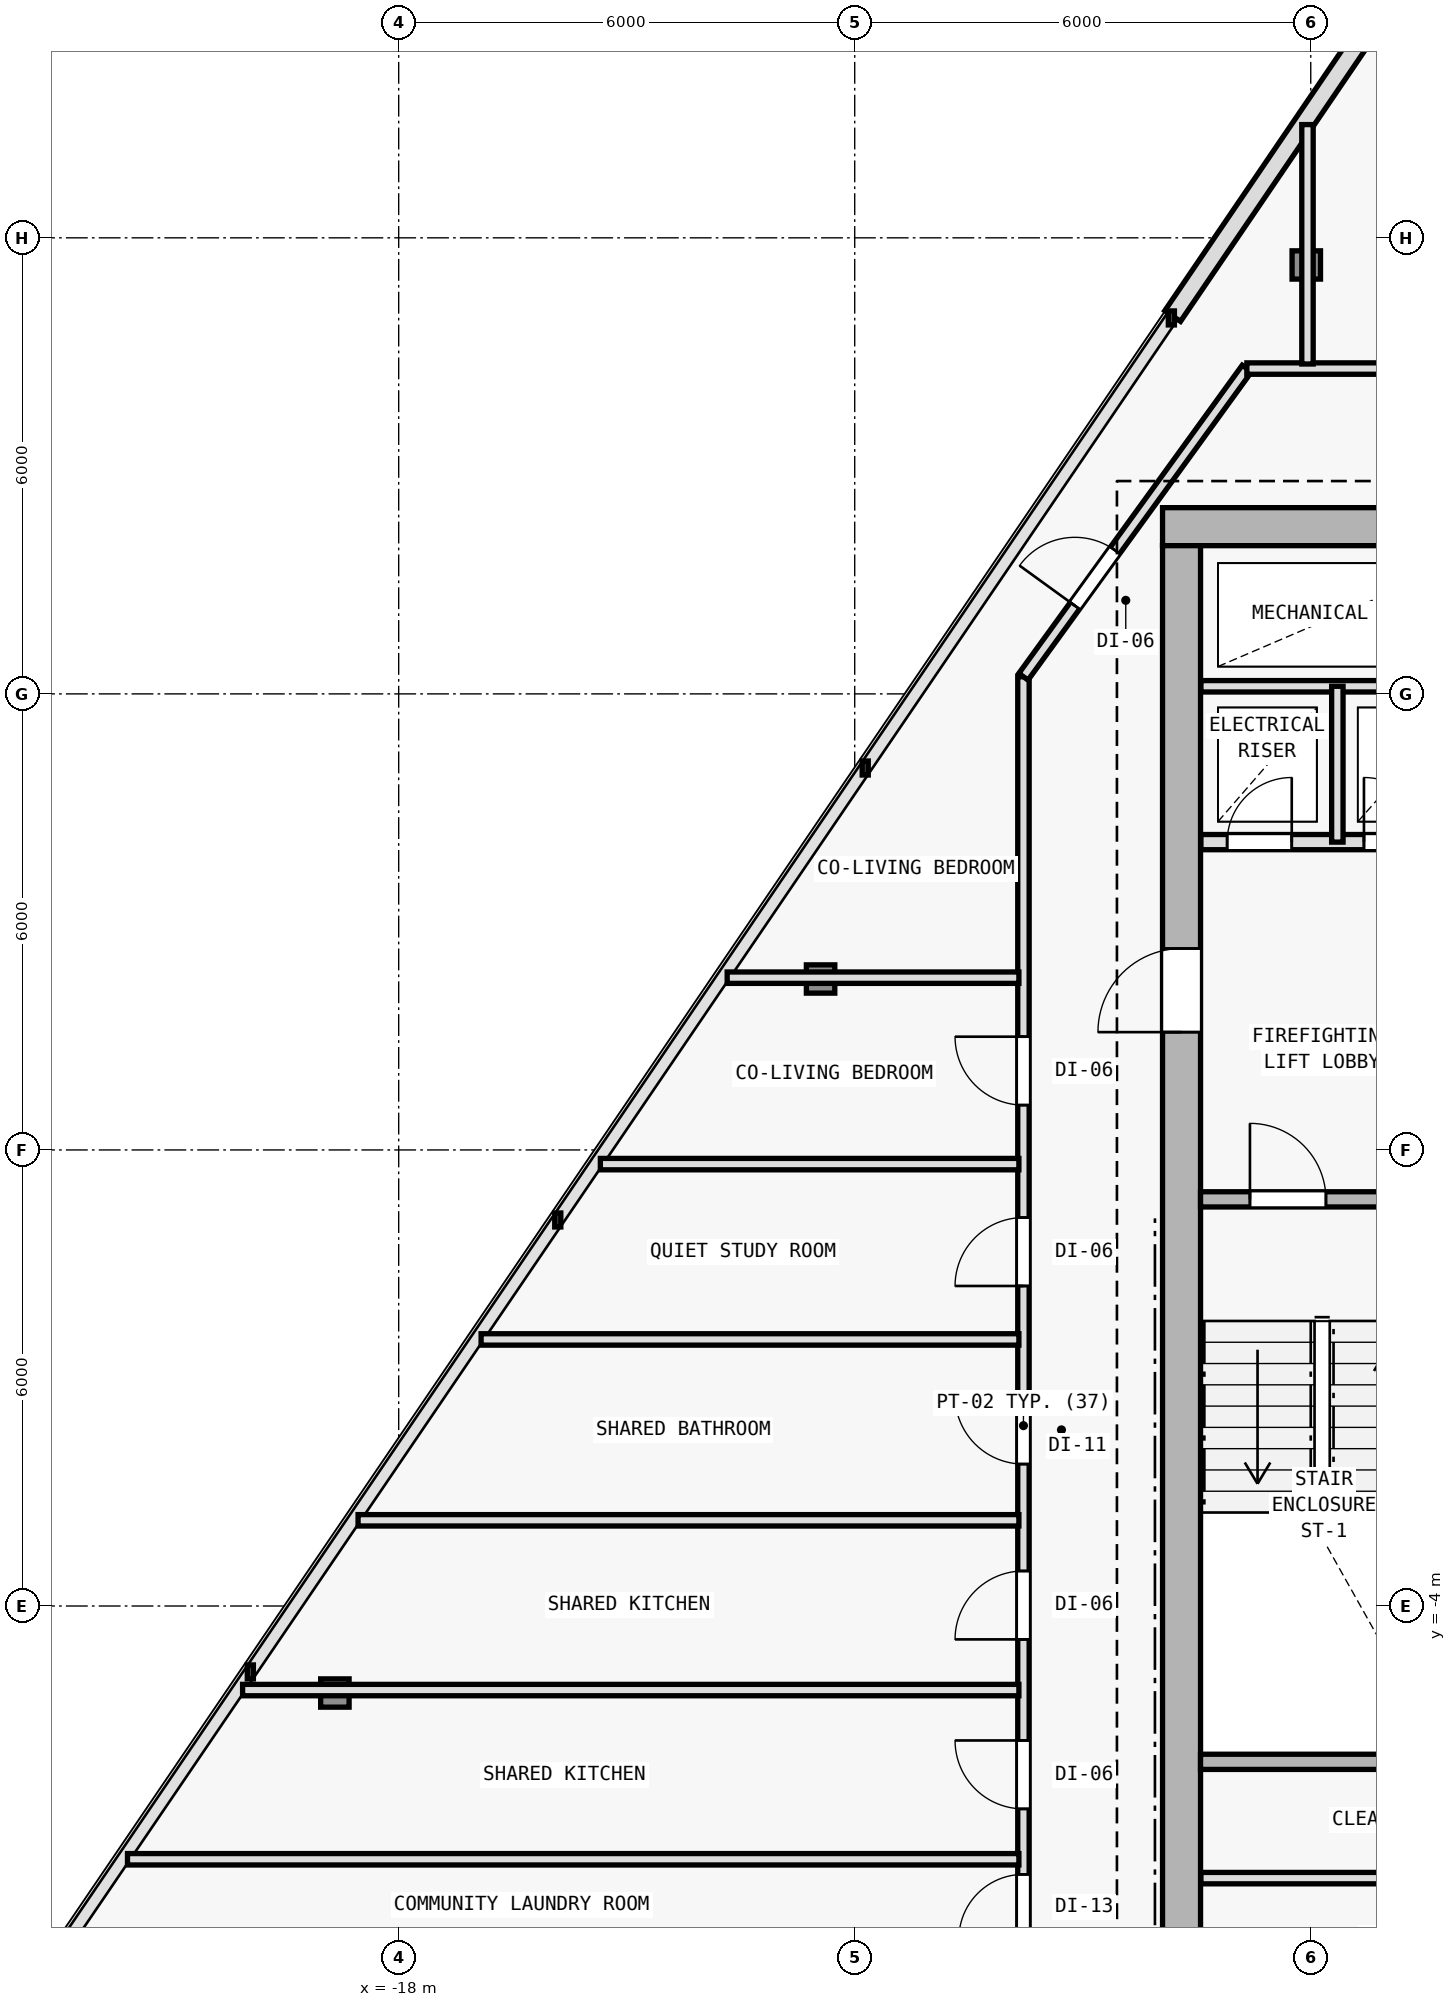
"""IFC4 building model, lengths in metres.
Left out: names, types, materials, properties, quantities, classifications, styles, units other than length and angle.
Written with IfcOpenShell. Run it as: python <this file> out.ifc"""

import sys

from ifc_helpers import new_model, si_unit, direction, frame, frame_2d, origin, origin_2d, place, context, subcontext, project, spatial, rectangle, i_section, extrude, element, fill, save


model = new_model("IFC4")
c1 = context("Model", 3, precision=1e-05, world=origin(), true_north=direction((0.0, 1.0)))
c2 = subcontext(c1, "Body", "Model", "MODEL_VIEW")
j1 = project(units=[si_unit("LENGTHUNIT", "METRE"), si_unit("PLANEANGLEUNIT", "RADIAN")], contexts=[c1])
p1 = place(None, origin())
s1 = spatial("IfcSite", under=j1, at=p1, CompositionType="ELEMENT")
p2 = place(p1, origin())
s2 = spatial("IfcBuilding", under=s1, at=p2, CompositionType="ELEMENT")
p3 = place(p2, frame((0.0, 0.0, 254.4)))
s3 = spatial("IfcBuildingStorey", under=s2, at=p3, CompositionType="ELEMENT", Elevation=254.4)
for number, where, z_axis, x_axis in (
    (1, (-7.7, 10.2, 0.0), (0.0, 0.0, 1.0), (1.0, 0.0, 0.0)),
    (2, (-7.7, 2.0, 0.0), (0.0, 0.0, 1.0), (1.0, 0.0, 0.0)),
):
    element("IfcColumn", number, at=place(p3, frame(where, z_axis=z_axis, x_axis=x_axis)), inside=s3, PredefinedType="COLUMN", context=c2, shape_type="SweptSolid", body=[
        extrude(i_section(OverallWidth=0.374, OverallDepth=0.372, WebThickness=0.012, FlangeThickness=0.02, FilletRadius=0.015, at=origin_2d()), origin(), (0.0, 0.0, 1.0), 3.6),
    ])
p4 = place(p3, frame((-6.059, 13.643, 0.006), z_axis=(0.008775143007, -0.002584925847, 0.999958156636), x_axis=(0.282568886397, 0.959247009086, 0.0)))
e3 = element("IfcColumn", 3, at=p4, inside=s3, PredefinedType="COLUMN", context=c2, shape_type="SweptSolid", body=[
    extrude(i_section(OverallWidth=0.374, OverallDepth=0.372, WebThickness=0.012, FlangeThickness=0.02, FilletRadius=0.015, at=origin_2d()), origin(), (0.0, 0.0, 1.0), 3.589),
])
p5 = place(p3, frame((-12.449, 4.249, 0.006), z_axis=(0.017071556321, 0.009589997774, 0.999808278575), x_axis=(-0.489766415861, 0.871853690647, 0.0)))
e4 = element("IfcColumn", 4, at=p5, inside=s3, PredefinedType="COLUMN", context=c2, shape_type="SweptSolid", body=[
    extrude(i_section(OverallWidth=0.374, OverallDepth=0.372, WebThickness=0.012, FlangeThickness=0.02, FilletRadius=0.015, at=origin_2d()), origin(), (0.0, 0.0, 1.0), 3.59),
])
p6 = place(p3, frame((-18.84, -5.145, 0.006), z_axis=(0.025224163578, 0.021620711639, 0.999447990843), x_axis=(-0.650791373456, 0.759256602365, 0.0)))
e5 = element("IfcColumn", 5, at=p6, inside=s3, PredefinedType="COLUMN", context=c2, shape_type="SweptSolid", body=[
    extrude(i_section(OverallWidth=0.374, OverallDepth=0.372, WebThickness=0.012, FlangeThickness=0.02, FilletRadius=0.015, at=origin_2d()), origin(), (0.0, 0.0, 1.0), 3.591),
])
p7 = place(p3, frame((-7.817, 12.971, 0.0), z_axis=(0.0, 0.0, 1.0), x_axis=(0.562474530687, 0.826814611826, 0.0)))
e6 = element("IfcWall", 6, at=p7, inside=s3, PredefinedType="SOLIDWALL", context=c2, shape_type="SweptSolid", body=[
    extrude(rectangle(XDim=10.107, YDim=0.25, at=frame_2d((5.053, 0.0))), origin(), (0.0, 0.0, 1.0), 3.35),
])
p8 = place(p7, frame((4.604, 0.0, 0.62)))
e7 = element("IfcOpeningElement", 7, at=p8, cuts=e6, PredefinedType="OPENING", context=c2, shape_type="SweptSolid", body=[
    extrude(rectangle(XDim=0.9, YDim=1.6, at=frame_2d((0.45, 0.8))), frame((0.0, 0.135, 0.0), z_axis=(0.0, -1.0, 0.0), x_axis=(1.0, 0.0, 0.0)), (0.0, 0.0, 1.0), 0.27),
])
p9 = place(p3, frame((7.95, 10.2, 0.0), z_axis=(0.0, 0.0, 1.0), x_axis=(-1.0, 0.0, 0.0)))
e8 = element("IfcWall", 8, at=p9, inside=s3, PredefinedType="SHEAR", context=c2, shape_type="SweptSolid", body=[
    extrude(rectangle(XDim=15.9, YDim=0.5, at=frame_2d((7.95, 0.0))), origin(), (0.0, 0.0, 1.0), 3.35),
])
p10 = place(p9, frame((4.4, 0.0, 0.0)))
e9 = element("IfcOpeningElement", 9, at=p10, cuts=e8, PredefinedType="OPENING", context=c2, shape_type="SweptSolid", body=[
    extrude(rectangle(XDim=1.1, YDim=2.15, at=frame_2d((0.55, 1.075))), frame((0.0, 0.26, 0.0), z_axis=(0.0, -1.0, 0.0), x_axis=(1.0, 0.0, 0.0)), (0.0, 0.0, 1.0), 0.52),
])
p11 = place(p3, frame((-7.7, -9.15, 0.0), z_axis=(0.0, 0.0, 1.0), x_axis=(0.0, 1.0, 0.0)))
e10 = element("IfcWall", 10, at=p11, inside=s3, PredefinedType="SHEAR", context=c2, shape_type="SweptSolid", body=[
    extrude(rectangle(XDim=19.1, YDim=0.5, at=frame_2d((9.55, 0.0))), origin(), (0.0, 0.0, 1.0), 3.35),
])
p12 = place(p11, frame((12.7, 0.0, 0.0)))
e11 = element("IfcOpeningElement", 11, at=p12, cuts=e10, PredefinedType="OPENING", context=c2, shape_type="SweptSolid", body=[
    extrude(rectangle(XDim=1.1, YDim=2.15, at=frame_2d((0.55, 1.075))), frame((0.0, 0.26, 0.0), z_axis=(0.0, -1.0, 0.0), x_axis=(1.0, 0.0, 0.0)), (0.0, 0.0, 1.0), 0.52),
])
p13 = place(p3, frame((-7.45, 1.35, 0.0), z_axis=(0.0, 0.0, 1.0), x_axis=(1.0, 0.0, 0.0)))
e12 = element("IfcWall", 12, at=p13, inside=s3, PredefinedType="SOLIDWALL", context=c2, shape_type="SweptSolid", body=[
    extrude(rectangle(XDim=3.4, YDim=0.2, at=frame_2d((1.7, 0.0))), origin(), (0.0, 0.0, 1.0), 3.35),
])
p14 = place(p13, frame((0.65, 0.0, 0.0)))
e13 = element("IfcOpeningElement", 13, at=p14, cuts=e12, PredefinedType="OPENING", context=c2, shape_type="SweptSolid", body=[
    extrude(rectangle(XDim=1.0, YDim=2.15, at=frame_2d((0.5, 1.075))), frame((0.0, 0.11, 0.0), z_axis=(0.0, -1.0, 0.0), x_axis=(1.0, 0.0, 0.0)), (0.0, 0.0, 1.0), 0.22),
])
p15 = place(p3, frame((-7.445, 6.05, 0.0), z_axis=(0.0, 0.0, 1.0), x_axis=(1.0, 0.0, 0.0)))
e14 = element("IfcWall", 14, at=p15, inside=s3, PredefinedType="SOLIDWALL", context=c2, shape_type="SweptSolid", body=[
    extrude(rectangle(XDim=3.595, YDim=0.2, at=frame_2d((1.797, 0.0))), origin(), (0.0, 0.0, 1.0), 3.35),
])
p16 = place(p15, frame((0.345, 0.0, 0.0)))
e15 = element("IfcOpeningElement", 15, at=p16, cuts=e14, PredefinedType="OPENING", context=c2, shape_type="SweptSolid", body=[
    extrude(rectangle(XDim=0.85, YDim=2.1, at=frame_2d((0.425, 1.05))), frame((0.0, 0.11, 0.0), z_axis=(0.0, -1.0, 0.0), x_axis=(1.0, 0.0, 0.0)), (0.0, 0.0, 1.0), 0.22),
])
p17 = place(p15, frame((2.145, 0.0, 0.0)))
e16 = element("IfcOpeningElement", 16, at=p17, cuts=e14, PredefinedType="OPENING", context=c2, shape_type="SweptSolid", body=[
    extrude(rectangle(XDim=0.85, YDim=2.1, at=frame_2d((0.425, 1.05))), frame((0.0, 0.11, 0.0), z_axis=(0.0, -1.0, 0.0), x_axis=(1.0, 0.0, 0.0)), (0.0, 0.0, 1.0), 0.22),
])
p18 = place(p3, frame((-7.445, 8.1, 0.0), z_axis=(0.0, 0.0, 1.0), x_axis=(1.0, 0.0, 0.0)))
e17 = element("IfcWall", 17, at=p18, inside=s3, PredefinedType="PARTITIONING", context=c2, shape_type="SweptSolid", body=[
    extrude(rectangle(XDim=3.595, YDim=0.15, at=frame_2d((1.797, 0.0))), origin(), (0.0, 0.0, 1.0), 3.35),
])
p19 = place(p3, frame((-5.65, 6.05, 0.0), z_axis=(0.0, 0.0, 1.0), x_axis=(0.0, 1.0, 0.0)))
e18 = element("IfcWall", 18, at=p19, inside=s3, PredefinedType="PARTITIONING", context=c2, shape_type="SweptSolid", body=[
    extrude(rectangle(XDim=2.05, YDim=0.15, at=frame_2d((1.025, 0.0))), origin(), (0.0, 0.0, 1.0), 3.35),
])
p20 = place(p3, frame((-7.45, -6.05, 0.0), z_axis=(0.0, 0.0, 1.0), x_axis=(1.0, 0.0, 0.0)))
e19 = element("IfcWall", 19, at=p20, inside=s3, PredefinedType="SOLIDWALL", context=c2, shape_type="SweptSolid", body=[
    extrude(rectangle(XDim=3.4, YDim=0.2, at=frame_2d((1.7, 0.0))), origin(), (0.0, 0.0, 1.0), 3.35),
])
p21 = place(p3, frame((-7.445, -7.58, 0.0), z_axis=(0.0, 0.0, 1.0), x_axis=(1.0, 0.0, 0.0)))
e20 = element("IfcWall", 20, at=p21, inside=s3, PredefinedType="PARTITIONING", context=c2, shape_type="SweptSolid", body=[
    extrude(rectangle(XDim=6.195, YDim=0.15, at=frame_2d((3.098, 0.0))), origin(), (0.0, 0.0, 1.0), 3.35),
])
p22 = place(p3, frame((-9.78, -11.48, 0.0), z_axis=(0.0, 0.0, 1.0), x_axis=(0.0, 1.0, 0.0)))
e21 = element("IfcWall", 21, at=p22, inside=s3, PredefinedType="PARTITIONING", context=c2, shape_type="SweptSolid", body=[
    extrude(rectangle(XDim=19.706, YDim=0.15, at=frame_2d((9.853, 0.0))), origin(), (0.0, 0.0, 1.0), 2.875),
])
p23 = place(p22, frame((9.347, 0.0, 0.0)))
e22 = element("IfcOpeningElement", 22, at=p23, cuts=e21, PredefinedType="OPENING", context=c2, shape_type="SweptSolid", body=[
    extrude(rectangle(XDim=0.9, YDim=2.1, at=frame_2d((0.45, 1.05))), frame((0.0, 0.085, 0.0), z_axis=(0.0, -1.0, 0.0), x_axis=(1.0, 0.0, 0.0)), (0.0, 0.0, 1.0), 0.17),
])
p24 = place(p22, frame((7.041, 0.0, 0.0)))
e23 = element("IfcOpeningElement", 23, at=p24, cuts=e21, PredefinedType="OPENING", context=c2, shape_type="SweptSolid", body=[
    extrude(rectangle(XDim=0.9, YDim=2.1, at=frame_2d((0.45, 1.05))), frame((0.0, 0.085, 0.0), z_axis=(0.0, -1.0, 0.0), x_axis=(1.0, 0.0, 0.0)), (0.0, 0.0, 1.0), 0.17),
])
p25 = place(p22, frame((4.811, 0.0, 0.0)))
e24 = element("IfcOpeningElement", 24, at=p25, cuts=e21, PredefinedType="OPENING", context=c2, shape_type="SweptSolid", body=[
    extrude(rectangle(XDim=0.9, YDim=2.1, at=frame_2d((0.45, 1.05))), frame((0.0, 0.085, 0.0), z_axis=(0.0, -1.0, 0.0), x_axis=(1.0, 0.0, 0.0)), (0.0, 0.0, 1.0), 0.17),
])
p26 = place(p22, frame((3.099, 0.0, 0.0)))
e25 = element("IfcOpeningElement", 25, at=p26, cuts=e21, PredefinedType="OPENING", context=c2, shape_type="SweptSolid", body=[
    extrude(rectangle(XDim=0.85, YDim=2.1, at=frame_2d((0.425, 1.05))), frame((0.0, 0.085, 0.0), z_axis=(0.0, -1.0, 0.0), x_axis=(1.0, 0.0, 0.0)), (0.0, 0.0, 1.0), 0.17),
])
p27 = place(p22, frame((1.114, 0.0, 0.0)))
e26 = element("IfcOpeningElement", 26, at=p27, cuts=e21, PredefinedType="OPENING", context=c2, shape_type="SweptSolid", body=[
    extrude(rectangle(XDim=0.9, YDim=2.1, at=frame_2d((0.45, 1.05))), frame((0.0, 0.085, 0.0), z_axis=(0.0, -1.0, 0.0), x_axis=(1.0, 0.0, 0.0)), (0.0, 0.0, 1.0), 0.17),
])
p28 = place(p22, frame((14.07, 0.0, 0.0)))
e27 = element("IfcOpeningElement", 27, at=p28, cuts=e21, PredefinedType="OPENING", context=c2, shape_type="SweptSolid", body=[
    extrude(rectangle(XDim=0.9, YDim=2.1, at=frame_2d((0.45, 1.05))), frame((0.0, 0.085, 0.0), z_axis=(0.0, -1.0, 0.0), x_axis=(1.0, 0.0, 0.0)), (0.0, 0.0, 1.0), 0.17),
])
p29 = place(p22, frame((11.69, 0.0, 0.0)))
e28 = element("IfcOpeningElement", 28, at=p29, cuts=e21, PredefinedType="OPENING", context=c2, shape_type="SweptSolid", body=[
    extrude(rectangle(XDim=0.9, YDim=2.1, at=frame_2d((0.45, 1.05))), frame((0.0, 0.085, 0.0), z_axis=(0.0, -1.0, 0.0), x_axis=(1.0, 0.0, 0.0)), (0.0, 0.0, 1.0), 0.17),
])
p30 = place(p3, frame((-9.78, 8.226, 0.0), z_axis=(0.0, 0.0, 1.0), x_axis=(0.586956386413, 0.809618552436, 0.0)))
e29 = element("IfcWall", 29, at=p30, inside=s3, PredefinedType="PARTITIONING", context=c2, shape_type="SweptSolid", body=[
    extrude(rectangle(XDim=5.008, YDim=0.15, at=frame_2d((2.504, 0.0))), origin(), (0.0, 0.0, 1.0), 2.925),
])
p31 = place(p30, frame((1.154, 0.0, 0.0)))
e30 = element("IfcOpeningElement", 30, at=p31, cuts=e29, PredefinedType="OPENING", context=c2, shape_type="SweptSolid", body=[
    extrude(rectangle(XDim=0.9, YDim=2.1, at=frame_2d((0.45, 1.05))), frame((0.0, 0.085, 0.0), z_axis=(0.0, -1.0, 0.0), x_axis=(1.0, 0.0, 0.0)), (0.0, 0.0, 1.0), 0.17),
])
p32 = place(p3, frame((-6.841, 12.28, 0.0), z_axis=(0.0, 0.0, 1.0), x_axis=(1.0, 0.0, 0.0)))
e31 = element("IfcWall", 31, at=p32, inside=s3, PredefinedType="PARTITIONING", context=c2, shape_type="SweptSolid", body=[
    extrude(rectangle(XDim=13.682, YDim=0.15, at=frame_2d((6.841, 0.0))), origin(), (0.0, 0.0, 1.0), 3.015),
])
p33 = place(p32, frame((4.825, 0.0, 0.0)))
e32 = element("IfcOpeningElement", 32, at=p33, cuts=e31, PredefinedType="OPENING", context=c2, shape_type="SweptSolid", body=[
    extrude(rectangle(XDim=0.9, YDim=2.1, at=frame_2d((0.45, 1.05))), frame((0.0, 0.085, 0.0), z_axis=(0.0, -1.0, 0.0), x_axis=(1.0, 0.0, 0.0)), (0.0, 0.0, 1.0), 0.17),
])
p34 = place(p3, frame((-6.043, 12.34, 0.0), z_axis=(0.0, 0.0, 1.0), x_axis=(0.0, 1.0, 0.0)))
e33 = element("IfcWall", 33, at=p34, inside=s3, PredefinedType="PARTITIONING", context=c2, shape_type="SweptSolid", body=[
    extrude(rectangle(XDim=3.15, YDim=0.15, at=frame_2d((1.575, 0.0))), origin(), (0.0, 0.0, 1.0), 3.015),
])
p35 = place(p3, frame((-9.84, 4.266, 0.0), z_axis=(0.0, 0.0, 1.0), x_axis=(-1.0, 0.0, 0.0)))
e34 = element("IfcWall", 34, at=p35, inside=s3, PredefinedType="PARTITIONING", context=c2, shape_type="SweptSolid", body=[
    extrude(rectangle(XDim=3.838, YDim=0.15, at=frame_2d((1.919, 0.0))), origin(), (0.0, 0.0, 1.0), 2.925),
])
p36 = place(p3, frame((-9.84, -5.106, 0.0), z_axis=(0.0, 0.0, 1.0), x_axis=(-1.0, 0.0, 0.0)))
e35 = element("IfcWall", 35, at=p36, inside=s3, PredefinedType="PARTITIONING", context=c2, shape_type="SweptSolid", body=[
    extrude(rectangle(XDim=10.214, YDim=0.15, at=frame_2d((5.107, 0.0))), origin(), (0.0, 0.0, 1.0), 2.875),
])
p37 = place(p3, frame((-9.84, -0.493, 0.0), z_axis=(0.0, 0.0, 1.0), x_axis=(-1.0, 0.0, 0.0)))
e36 = element("IfcWall", 36, at=p37, inside=s3, PredefinedType="PARTITIONING", context=c2, shape_type="SweptSolid", body=[
    extrude(rectangle(XDim=7.076, YDim=0.15, at=frame_2d((3.538, 0.0))), origin(), (0.0, 0.0, 1.0), 2.965),
])
p38 = place(p3, frame((-9.84, -2.873, 0.0), z_axis=(0.0, 0.0, 1.0), x_axis=(-1.0, 0.0, 0.0)))
e37 = element("IfcWall", 37, at=p38, inside=s3, PredefinedType="PARTITIONING", context=c2, shape_type="SweptSolid", body=[
    extrude(rectangle(XDim=8.694, YDim=0.15, at=frame_2d((4.347, 0.0))), origin(), (0.0, 0.0, 1.0), 2.965),
])
p39 = place(p3, frame((-9.84, -7.332, 0.0), z_axis=(0.0, 0.0, 1.0), x_axis=(-1.0, 0.0, 0.0)))
e38 = element("IfcWall", 38, at=p39, inside=s3, PredefinedType="PARTITIONING", context=c2, shape_type="SweptSolid", body=[
    extrude(rectangle(XDim=11.728, YDim=0.15, at=frame_2d((5.864, 0.0))), origin(), (0.0, 0.0, 1.0), 2.875),
])
p40 = place(p3, frame((-9.84, 1.814, 0.0), z_axis=(0.0, 0.0, 1.0), x_axis=(-1.0, 0.0, 0.0)))
e39 = element("IfcWall", 39, at=p40, inside=s3, PredefinedType="PARTITIONING", context=c2, shape_type="SweptSolid", body=[
    extrude(rectangle(XDim=5.507, YDim=0.15, at=frame_2d((2.753, 0.0))), origin(), (0.0, 0.0, 1.0), 2.965),
])
p41 = place(p12, origin())
e40 = element("IfcDoor", 40, at=p41, inside=s3, OperationType="SINGLE_SWING_LEFT", PredefinedType="DOOR", context=c2, shape_type="SweptSolid", body=[
    extrude(rectangle(XDim=1.1, YDim=2.15, at=frame_2d((0.55, 1.075))), frame((0.0, 0.025, 0.0), z_axis=(0.0, -1.0, 0.0), x_axis=(1.0, 0.0, 0.0)), (0.0, 0.0, 1.0), 0.05),
])
fill(e11, e40)
p42 = place(p14, origin())
e41 = element("IfcDoor", 41, at=p42, inside=s3, OperationType="SINGLE_SWING_LEFT", PredefinedType="DOOR", context=c2, shape_type="SweptSolid", body=[
    extrude(rectangle(XDim=1.0, YDim=2.15, at=frame_2d((0.5, 1.075))), frame((0.0, 0.025, 0.0), z_axis=(0.0, -1.0, 0.0), x_axis=(1.0, 0.0, 0.0)), (0.0, 0.0, 1.0), 0.05),
])
fill(e13, e41)
p43 = place(p16, origin())
e42 = element("IfcDoor", 42, at=p43, inside=s3, OperationType="SINGLE_SWING_RIGHT", PredefinedType="DOOR", context=c2, shape_type="SweptSolid", body=[
    extrude(rectangle(XDim=0.85, YDim=2.1, at=frame_2d((0.425, 1.05))), frame((0.0, 0.025, 0.0), z_axis=(0.0, -1.0, 0.0), x_axis=(1.0, 0.0, 0.0)), (0.0, 0.0, 1.0), 0.05),
])
fill(e15, e42)
p44 = place(p17, origin())
e43 = element("IfcDoor", 43, at=p44, inside=s3, OperationType="SINGLE_SWING_LEFT", PredefinedType="DOOR", context=c2, shape_type="SweptSolid", body=[
    extrude(rectangle(XDim=0.85, YDim=2.1, at=frame_2d((0.425, 1.05))), frame((0.0, 0.025, 0.0), z_axis=(0.0, -1.0, 0.0), x_axis=(1.0, 0.0, 0.0)), (0.0, 0.0, 1.0), 0.05),
])
fill(e16, e43)
p45 = place(p23, origin())
e44 = element("IfcDoor", 44, at=p45, inside=s3, OperationType="SINGLE_SWING_RIGHT", PredefinedType="DOOR", context=c2, shape_type="SweptSolid", body=[
    extrude(rectangle(XDim=0.9, YDim=2.1, at=frame_2d((0.45, 1.05))), frame((0.0, 0.025, 0.0), z_axis=(0.0, -1.0, 0.0), x_axis=(1.0, 0.0, 0.0)), (0.0, 0.0, 1.0), 0.05),
])
fill(e22, e44)
p46 = place(p24, origin())
e45 = element("IfcDoor", 45, at=p46, inside=s3, OperationType="SINGLE_SWING_LEFT", PredefinedType="DOOR", context=c2, shape_type="SweptSolid", body=[
    extrude(rectangle(XDim=0.9, YDim=2.1, at=frame_2d((0.45, 1.05))), frame((0.0, 0.025, 0.0), z_axis=(0.0, -1.0, 0.0), x_axis=(1.0, 0.0, 0.0)), (0.0, 0.0, 1.0), 0.05),
])
fill(e23, e45)
p47 = place(p25, origin())
e46 = element("IfcDoor", 46, at=p47, inside=s3, OperationType="SINGLE_SWING_RIGHT", PredefinedType="DOOR", context=c2, shape_type="SweptSolid", body=[
    extrude(rectangle(XDim=0.9, YDim=2.1, at=frame_2d((0.45, 1.05))), frame((0.0, 0.025, 0.0), z_axis=(0.0, -1.0, 0.0), x_axis=(1.0, 0.0, 0.0)), (0.0, 0.0, 1.0), 0.05),
])
fill(e24, e46)
p48 = place(p26, origin())
e47 = element("IfcDoor", 47, at=p48, inside=s3, OperationType="SINGLE_SWING_LEFT", PredefinedType="DOOR", context=c2, shape_type="SweptSolid", body=[
    extrude(rectangle(XDim=0.85, YDim=2.1, at=frame_2d((0.425, 1.05))), frame((0.0, 0.025, 0.0), z_axis=(0.0, -1.0, 0.0), x_axis=(1.0, 0.0, 0.0)), (0.0, 0.0, 1.0), 0.05),
])
fill(e25, e47)
p49 = place(p31, origin())
e48 = element("IfcDoor", 48, at=p49, inside=s3, OperationType="SINGLE_SWING_LEFT", PredefinedType="DOOR", context=c2, shape_type="SweptSolid", body=[
    extrude(rectangle(XDim=0.9, YDim=2.1, at=frame_2d((0.45, 1.05))), frame((0.0, 0.025, 0.0), z_axis=(0.0, -1.0, 0.0), x_axis=(1.0, 0.0, 0.0)), (0.0, 0.0, 1.0), 0.05),
])
fill(e30, e48)
p50 = place(p28, origin())
e49 = element("IfcDoor", 49, at=p50, inside=s3, OperationType="SINGLE_SWING_RIGHT", PredefinedType="DOOR", context=c2, shape_type="SweptSolid", body=[
    extrude(rectangle(XDim=0.9, YDim=2.1, at=frame_2d((0.45, 1.05))), frame((0.0, 0.025, 0.0), z_axis=(0.0, -1.0, 0.0), x_axis=(1.0, 0.0, 0.0)), (0.0, 0.0, 1.0), 0.05),
])
fill(e27, e49)
p51 = place(p29, origin())
e50 = element("IfcDoor", 50, at=p51, inside=s3, OperationType="SINGLE_SWING_LEFT", PredefinedType="DOOR", context=c2, shape_type="SweptSolid", body=[
    extrude(rectangle(XDim=0.9, YDim=2.1, at=frame_2d((0.45, 1.05))), frame((0.0, 0.025, 0.0), z_axis=(0.0, -1.0, 0.0), x_axis=(1.0, 0.0, 0.0)), (0.0, 0.0, 1.0), 0.05),
])
fill(e28, e50)
save(model, sys.argv[1])
